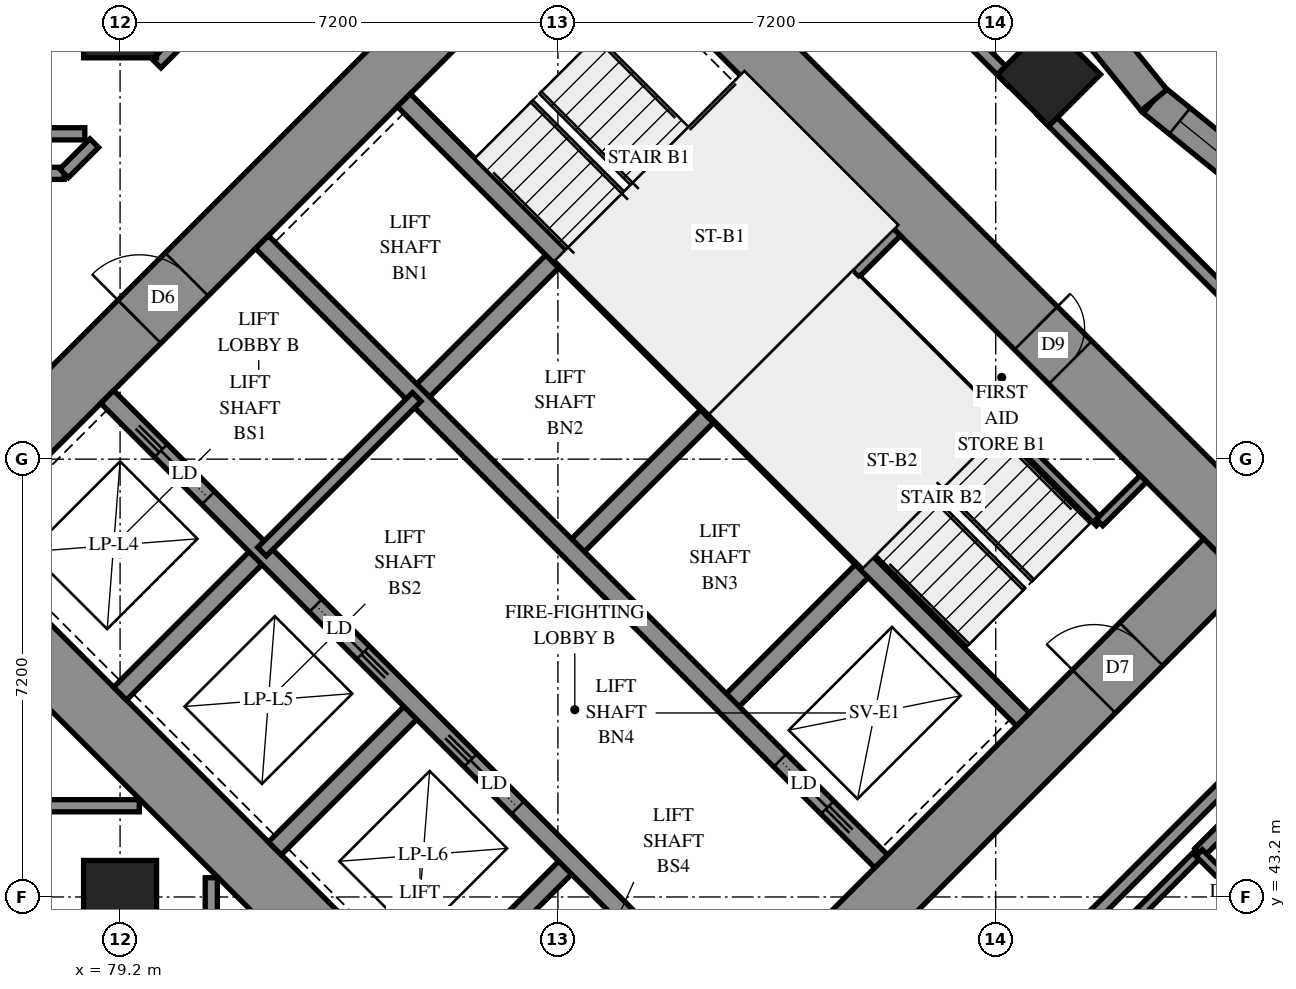
"""IFC4 building model, lengths in metres.
Left out: names, types, materials, properties, quantities, classifications, styles, units other than length and angle.
Written with IfcOpenShell. Run it as: python <this file> out.ifc"""

import sys

from ifc_helpers import new_model, si_unit, direction, frame, frame_2d, origin, origin_2d, place, context, subcontext, project, spatial, polyline, rectangle, outline, extrude, element, fill, save


model = new_model("IFC4")
c1 = context("Model", 3, precision=1e-05, world=origin(), true_north=direction((0.0, 1.0)))
c2 = subcontext(c1, "Body", "Model", "MODEL_VIEW")
j1 = project(units=[si_unit("LENGTHUNIT", "METRE"), si_unit("PLANEANGLEUNIT", "RADIAN")], contexts=[c1])
p1 = place(None, origin())
s1 = spatial("IfcSite", under=j1, at=p1, CompositionType="ELEMENT")
p2 = place(p1, origin())
s2 = spatial("IfcBuilding", under=s1, at=p2, CompositionType="ELEMENT")
p3 = place(p2, frame((0.0, 0.0, 33.8)))
s3 = spatial("IfcBuildingStorey", under=s2, at=p3, CompositionType="ELEMENT", Elevation=33.8)
for number, where, z_axis, x_axis in (
    (1, (79.2, 43.2, 0.0), (0.0, 0.0, 1.0), (1.0, 0.0, 0.0)),
    (2, (79.2, 57.6, 0.0), (0.0, 0.0, 1.0), (1.0, 0.0, 0.0)),
    (3, (94.474, 56.727, 0.0), (0.0, 0.0, 1.0), (0.707, -0.707, 0.0)),
):
    element("IfcColumn", number, at=place(p3, frame(where, z_axis=z_axis, x_axis=x_axis)), inside=s3, PredefinedType="COLUMN", context=c2, shape_type="SweptSolid", body=[
        extrude(rectangle(XDim=1.2, YDim=1.2, at=origin_2d()), origin(), (0.0, 0.0, 1.0), 3.1),
    ])
p4 = place(p3, frame((75.594, 49.443, -0.3), z_axis=(0.0, 0.0, 1.0), x_axis=(0.7071037324, -0.70710983, 0.0)))
e4 = element("IfcWall", 4, at=p4, inside=s3, PredefinedType="SHEAR", context=c2, shape_type="SweptSolid", body=[
    extrude(rectangle(XDim=16.4, YDim=1.0, at=frame_2d((8.2, 0.0))), origin(), (0.0, 0.0, 1.0), 2.7),
])
p5 = place(p3, frame((86.483, 60.333, -0.3), z_axis=(0.0, 0.0, 1.0), x_axis=(0.70710983, -0.7071037324, 0.0)))
e5 = element("IfcWall", 5, at=p5, inside=s3, PredefinedType="SHEAR", context=c2, shape_type="SweptSolid", body=[
    extrude(rectangle(XDim=16.4, YDim=1.0, at=frame_2d((8.2, 0.0))), origin(), (0.0, 0.0, 1.0), 2.7),
])
p6 = place(p5, frame((11.0, 0.0, 0.3)))
e6 = element("IfcOpeningElement", 6, at=p6, cuts=e5, PredefinedType="OPENING", context=c2, shape_type="SweptSolid", body=[
    extrude(rectangle(XDim=0.8, YDim=2.1, at=frame_2d((0.4, 1.05))), frame((0.0, 0.51, 0.0), z_axis=(0.0, -1.0, 0.0), x_axis=(1.0, 0.0, 0.0)), (0.0, 0.0, 1.0), 1.02),
])
p7 = place(p3, frame((76.301, 49.443, -0.3), z_axis=(0.0, 0.0, 1.0), x_axis=(0.7071067812, 0.7071067812, 0.0)))
e7 = element("IfcWall", 7, at=p7, inside=s3, PredefinedType="SHEAR", context=c2, shape_type="SweptSolid", body=[
    extrude(rectangle(XDim=14.4, YDim=1.0, at=frame_2d((7.2, 0.0))), origin(), (0.0, 0.0, 1.0), 2.7),
])
p8 = place(p7, frame((4.55, 0.0, 0.3)))
e8 = element("IfcOpeningElement", 8, at=p8, cuts=e7, PredefinedType="OPENING", context=c2, shape_type="SweptSolid", body=[
    extrude(rectangle(XDim=1.1, YDim=2.1, at=frame_2d((0.55, 1.05))), frame((0.0, 0.51, 0.0), z_axis=(0.0, -1.0, 0.0), x_axis=(1.0, 0.0, 0.0)), (0.0, 0.0, 1.0), 1.02),
])
p9 = place(p7, frame((11.35, 0.0, 0.3)))
e9 = element("IfcOpeningElement", 9, at=p9, cuts=e7, PredefinedType="OPENING", context=c2, shape_type="SweptSolid", body=[
    extrude(rectangle(XDim=1.1, YDim=2.1, at=frame_2d((0.55, 1.05))), frame((0.0, 0.51, 0.0), z_axis=(0.0, -1.0, 0.0), x_axis=(1.0, 0.0, 0.0)), (0.0, 0.0, 1.0), 1.02),
])
p10 = place(p3, frame((87.19, 38.554, -0.3), z_axis=(0.0, 0.0, 1.0), x_axis=(0.707103309, 0.7071102534, 0.0)))
e10 = element("IfcWall", 10, at=p10, inside=s3, PredefinedType="SHEAR", context=c2, shape_type="SweptSolid", body=[
    extrude(rectangle(XDim=14.4, YDim=1.0, at=frame_2d((7.2, 0.0))), origin(), (0.0, 0.0, 1.0), 2.7),
])
p11 = place(p10, frame((4.55, 0.0, 0.3)))
e11 = element("IfcOpeningElement", 11, at=p11, cuts=e10, PredefinedType="OPENING", context=c2, shape_type="SweptSolid", body=[
    extrude(rectangle(XDim=1.1, YDim=2.1, at=frame_2d((0.55, 1.05))), frame((0.0, 0.51, 0.0), z_axis=(0.0, -1.0, 0.0), x_axis=(1.0, 0.0, 0.0)), (0.0, 0.0, 1.0), 1.02),
])
p12 = place(p10, frame((11.35, 0.0, 0.3)))
e12 = element("IfcOpeningElement", 12, at=p12, cuts=e10, PredefinedType="OPENING", context=c2, shape_type="SweptSolid", body=[
    extrude(rectangle(XDim=1.1, YDim=2.1, at=frame_2d((0.55, 1.05))), frame((0.0, 0.51, 0.0), z_axis=(0.0, -1.0, 0.0), x_axis=(1.0, 0.0, 0.0)), (0.0, 0.0, 1.0), 1.02),
])
for number, where, z_axis, x_axis in (
    (13, (79.2, 46.544, 0.0), (0.0, 0.0, 1.0), (0.707, 0.707, 0.0)),
    (14, (84.079, 51.423, 0.0), (0.0, 0.0, 1.0), (0.707, 0.707, 0.0)),
):
    element("IfcWall", number, at=place(p3, frame(where, z_axis=z_axis, x_axis=x_axis)), inside=s3, PredefinedType="SOLIDWALL", context=c2, shape_type="SweptSolid", body=[
        extrude(rectangle(XDim=3.3, YDim=0.3, at=frame_2d((1.65, 0.0))), origin(), (0.0, 0.0, 1.0), 3.1),
    ])
p13 = place(p3, frame((81.746, 43.999, 0.0), z_axis=(0.0, 0.0, 1.0), x_axis=(0.7071067812, 0.7071067812, 0.0)))
e15 = element("IfcWall", 15, at=p13, inside=s3, PredefinedType="SOLIDWALL", context=c2, shape_type="SweptSolid", body=[
    extrude(rectangle(XDim=3.3, YDim=0.3, at=frame_2d((1.65, 0.0))), origin(), (0.0, 0.0, 1.0), 3.1),
])
p14 = place(p3, frame((86.625, 48.878, 0.0), z_axis=(0.0, 0.0, 1.0), x_axis=(0.7071067812, 0.7071067812, 0.0)))
e16 = element("IfcWall", 16, at=p14, inside=s3, PredefinedType="SOLIDWALL", context=c2, shape_type="SweptSolid", body=[
    extrude(rectangle(XDim=3.3, YDim=0.3, at=frame_2d((1.65, 0.0))), origin(), (0.0, 0.0, 1.0), 3.1),
])
p15 = place(p3, frame((84.291, 41.453, 0.0), z_axis=(0.0, 0.0, 1.0), x_axis=(0.7071067812, 0.7071067812, 0.0)))
e17 = element("IfcWall", 17, at=p15, inside=s3, PredefinedType="SOLIDWALL", context=c2, shape_type="SweptSolid", body=[
    extrude(rectangle(XDim=3.3, YDim=0.3, at=frame_2d((1.65, 0.0))), origin(), (0.0, 0.0, 1.0), 3.1),
])
p16 = place(p3, frame((89.17, 46.332, 0.0), z_axis=(0.0, 0.0, 1.0), x_axis=(0.7071067812, 0.7071067812, 0.0)))
e18 = element("IfcWall", 18, at=p16, inside=s3, PredefinedType="SOLIDWALL", context=c2, shape_type="SweptSolid", body=[
    extrude(rectangle(XDim=3.3, YDim=0.3, at=frame_2d((1.65, 0.0))), origin(), (0.0, 0.0, 1.0), 3.1),
])
p17 = place(p3, frame((78.988, 51.423, 0.0), z_axis=(0.0, 0.0, 1.0), x_axis=(0.7071067812, -0.7071067812, 0.0)))
e19 = element("IfcWall", 19, at=p17, inside=s3, PredefinedType="SOLIDWALL", context=c2, shape_type="SweptSolid", body=[
    extrude(rectangle(XDim=14.4, YDim=0.3, at=frame_2d((7.2, 0.0))), origin(), (0.0, 0.0, 1.0), 3.1),
])
p18 = place(p17, frame((1.25, 0.0, 0.0)))
e20 = element("IfcOpeningElement", 20, at=p18, cuts=e19, PredefinedType="OPENING", context=c2, shape_type="SweptSolid", body=[
    extrude(rectangle(XDim=1.1, YDim=2.1, at=frame_2d((0.55, 1.05))), frame((0.0, 0.16, 0.0), z_axis=(0.0, -1.0, 0.0), x_axis=(1.0, 0.0, 0.0)), (0.0, 0.0, 1.0), 0.32),
])
p19 = place(p17, frame((4.85, 0.0, 0.0)))
e21 = element("IfcOpeningElement", 21, at=p19, cuts=e19, PredefinedType="OPENING", context=c2, shape_type="SweptSolid", body=[
    extrude(rectangle(XDim=1.1, YDim=2.1, at=frame_2d((0.55, 1.05))), frame((0.0, 0.16, 0.0), z_axis=(0.0, -1.0, 0.0), x_axis=(1.0, 0.0, 0.0)), (0.0, 0.0, 1.0), 0.32),
])
p20 = place(p17, frame((8.45, 0.0, 0.0)))
e22 = element("IfcOpeningElement", 22, at=p20, cuts=e19, PredefinedType="OPENING", context=c2, shape_type="SweptSolid", body=[
    extrude(rectangle(XDim=1.1, YDim=2.1, at=frame_2d((0.55, 1.05))), frame((0.0, 0.16, 0.0), z_axis=(0.0, -1.0, 0.0), x_axis=(1.0, 0.0, 0.0)), (0.0, 0.0, 1.0), 0.32),
])
p21 = place(p17, frame((12.05, 0.0, 0.0)))
e23 = element("IfcOpeningElement", 23, at=p21, cuts=e19, PredefinedType="OPENING", context=c2, shape_type="SweptSolid", body=[
    extrude(rectangle(XDim=1.1, YDim=2.1, at=frame_2d((0.55, 1.05))), frame((0.0, 0.16, 0.0), z_axis=(0.0, -1.0, 0.0), x_axis=(1.0, 0.0, 0.0)), (0.0, 0.0, 1.0), 0.32),
])
p22 = place(p3, frame((81.534, 53.969, 0.0), z_axis=(0.0, 0.0, 1.0), x_axis=(0.707103309, -0.7071102534, 0.0)))
e24 = element("IfcWall", 24, at=p22, inside=s3, PredefinedType="SOLIDWALL", context=c2, shape_type="SweptSolid", body=[
    extrude(rectangle(XDim=14.4, YDim=0.3, at=frame_2d((7.2, 0.0))), origin(), (0.0, 0.0, 1.0), 3.1),
])
p23 = place(p22, frame((12.05, 0.0, 0.0)))
e25 = element("IfcOpeningElement", 25, at=p23, cuts=e24, PredefinedType="OPENING", context=c2, shape_type="SweptSolid", body=[
    extrude(rectangle(XDim=1.1, YDim=2.1, at=frame_2d((0.55, 1.05))), frame((0.0, 0.16, 0.0), z_axis=(0.0, -1.0, 0.0), x_axis=(1.0, 0.0, 0.0)), (0.0, 0.0, 1.0), 0.32),
])
for number, where, z_axis, x_axis in (
    (26, (83.867, 56.302, 0.0), (0.0, 0.0, 1.0), (0.707, -0.707, 0.0)),
    (27, (88.958, 51.211, 0.0), (0.0, 0.0, 1.0), (0.707, -0.707, 0.0)),
):
    element("IfcWall", number, at=place(p3, frame(where, z_axis=z_axis, x_axis=x_axis)), inside=s3, PredefinedType="SOLIDWALL", context=c2, shape_type="SweptSolid", body=[
        extrude(rectangle(XDim=7.2, YDim=0.3, at=frame_2d((3.6, 0.0))), origin(), (0.0, 0.0, 1.0), 3.1),
    ])
p24 = place(p3, frame((88.958, 51.211, 0.0), z_axis=(0.0, 0.0, 1.0), x_axis=(0.7071067812, 0.7071067812, 0.0)))
e28 = element("IfcWall", 28, at=p24, inside=s3, PredefinedType="SOLIDWALL", context=c2, shape_type="SweptSolid", body=[
    extrude(rectangle(XDim=4.2, YDim=0.3, at=frame_2d((2.1, 0.0))), origin(), (0.0, 0.0, 1.0), 3.1),
])
p25 = place(p3, frame((98.884, 54.133, 0.0), z_axis=(0.0, 0.0, 1.0), x_axis=(-0.7772131435, 0.6292374191, 0.0)))
e29 = element("IfcWall", 29, at=p25, inside=s3, PredefinedType="SOLIDWALL", context=c2, shape_type="SweptSolid", body=[
    extrude(outline(polyline([(-0.029, -0.275), (3.421, -0.275), (3.479, 0.275), (0.029, 0.275), (-0.029, -0.275)])), origin(), (0.0, 0.0, 1.0), 3.1),
])
p26 = place(p25, frame((1.705, 0.0, 0.5)))
e30 = element("IfcOpeningElement", 30, at=p26, cuts=e29, PredefinedType="OPENING", context=c2, shape_type="SweptSolid", body=[
    extrude(rectangle(XDim=1.2, YDim=2.45, at=frame_2d((0.6, 1.225))), frame((0.0, 0.285, 0.0), z_axis=(0.0, -1.0, 0.0), x_axis=(1.0, 0.0, 0.0)), (0.0, 0.0, 1.0), 0.57),
])
p27 = place(p3, frame((96.202, 56.304, 0.0), z_axis=(0.0, 0.0, 1.0), x_axis=(-0.6292374191, 0.7772131435, 0.0)))
e31 = element("IfcWall", 31, at=p27, inside=s3, PredefinedType="SOLIDWALL", context=c2, shape_type="SweptSolid", body=[
    extrude(outline(polyline([(0.029, -0.275), (3.479, -0.275), (3.421, 0.275), (-0.029, 0.275), (0.029, -0.275)])), origin(), (0.0, 0.0, 1.0), 3.1),
])
p28 = place(p27, frame((1.775, 0.0, 0.5)))
e32 = element("IfcOpeningElement", 32, at=p28, cuts=e31, PredefinedType="OPENING", context=c2, shape_type="SweptSolid", body=[
    extrude(rectangle(XDim=1.2, YDim=2.45, at=frame_2d((0.6, 1.225))), frame((0.0, 0.285, 0.0), z_axis=(0.0, -1.0, 0.0), x_axis=(1.0, 0.0, 0.0)), (0.0, 0.0, 1.0), 0.57),
])
p29 = place(p3, frame((91.313, 53.354, 0.0), z_axis=(0.0, 0.0, 1.0), x_axis=(0.7071067812, -0.7071067812, 0.0)))
e33 = element("IfcWall", 33, at=p29, inside=s3, PredefinedType="PARTITIONING", context=c2, shape_type="SweptSolid", body=[
    extrude(rectangle(XDim=5.65, YDim=0.15, at=frame_2d((2.825, 0.0))), origin(), (0.0, 0.0, 1.0), 3.1),
])
p30 = place(p3, frame((95.308, 49.358, 0.0), z_axis=(0.0, 0.0, 1.0), x_axis=(0.70705776, 0.707155799, 0.0)))
e34 = element("IfcWall", 34, at=p30, inside=s3, PredefinedType="PARTITIONING", context=c2, shape_type="SweptSolid", body=[
    extrude(rectangle(XDim=1.02, YDim=0.15, at=frame_2d((0.51, 0.0))), origin(), (0.0, 0.0, 1.0), 3.1),
])
p31 = place(p3, frame((81.534, 48.878, 0.0), z_axis=(0.0, 0.0, 1.0), x_axis=(0.707092892, 0.7071206701, 0.0)))
e35 = element("IfcWall", 35, at=p31, inside=s3, PredefinedType="PARTITIONING", context=c2, shape_type="SweptSolid", body=[
    extrude(rectangle(XDim=3.6, YDim=0.2, at=frame_2d((1.8, 0.0))), origin(), (0.0, 0.0, 1.0), 3.1),
])
p32 = place(p3, frame((94.901, 42.583, 0.0), z_axis=(0.0, 0.0, 1.0), x_axis=(0.7072154749, 0.7069980708, 0.0)))
e36 = element("IfcWall", 36, at=p32, inside=s3, PredefinedType="PARTITIONING", context=c2, shape_type="SweptSolid", body=[
    extrude(rectangle(XDim=9.2, YDim=0.2, at=frame_2d((4.6, 0.0))), origin(), (0.0, 0.0, 1.0), 3.1),
])
p33 = place(p3, frame((96.947, 43.929, 0.0), z_axis=(0.0, 0.0, 1.0), x_axis=(0.7071067812, 0.7071067812, 0.0)))
e37 = element("IfcWall", 37, at=p33, inside=s3, PredefinedType="PARTITIONING", context=c2, shape_type="SweptSolid", body=[
    extrude(rectangle(XDim=8.201, YDim=0.2, at=frame_2d((4.101, 0.0))), origin(), (0.0, 0.0, 1.0), 3.1),
])
p34 = place(p3, frame((89.271, 61.215, 0.0), z_axis=(0.0, 0.0, 1.0), x_axis=(0.7071067812, -0.7071067812, 0.0)))
e38 = element("IfcWall", 38, at=p34, inside=s3, PredefinedType="PARTITIONING", context=c2, shape_type="SweptSolid", body=[
    extrude(rectangle(XDim=6.505, YDim=0.2, at=frame_2d((3.253, 0.0))), origin(), (0.0, 0.0, 1.0), 3.1),
])
p35 = place(p3, frame((94.363, 56.123, 0.0), z_axis=(0.0, 0.0, 1.0), x_axis=(0.7071067812, -0.7071067812, 0.0)))
e39 = element("IfcWall", 39, at=p35, inside=s3, PredefinedType="PARTITIONING", context=c2, shape_type="SweptSolid", body=[
    extrude(rectangle(XDim=6.503, YDim=0.2, at=frame_2d((3.251, 0.0))), origin(), (0.0, 0.0, 1.0), 3.1),
])
p36 = place(p3, frame((75.102, 55.1, 0.0), z_axis=(0.0, 0.0, 1.0), x_axis=(1.0, 0.0, 0.0)))
e40 = element("IfcWall", 40, at=p36, inside=s3, PredefinedType="PARTITIONING", context=c2, shape_type="SweptSolid", body=[
    extrude(rectangle(XDim=3.178, YDim=0.2, at=frame_2d((1.589, 0.0))), origin(), (0.0, 0.0, 1.0), 3.1),
])
p37 = place(p36, frame((0.594, 0.0, 0.0)))
e41 = element("IfcOpeningElement", 41, at=p37, cuts=e40, PredefinedType="OPENING", context=c2, shape_type="SweptSolid", body=[
    extrude(rectangle(XDim=1.0, YDim=2.1, at=frame_2d((0.5, 1.05))), frame((0.0, 0.11, 0.0), z_axis=(0.0, -1.0, 0.0), x_axis=(1.0, 0.0, 0.0)), (0.0, 0.0, 1.0), 0.22),
])
p38 = place(p3, frame((95.252, 42.23, 0.0), z_axis=(0.0, 0.0, 1.0), x_axis=(0.706689978, 0.7075233388, 0.0)))
e42 = element("IfcWall", 42, at=p38, inside=s3, PredefinedType="PARTITIONING", context=c2, shape_type="SweptSolid", body=[
    extrude(rectangle(XDim=2.4, YDim=0.15, at=frame_2d((1.2, 0.0))), origin(), (0.0, 0.0, 1.0), 3.1),
])
p39 = place(p3, frame((96.945, 43.925, 0.0), z_axis=(0.0, 0.0, 1.0), x_axis=(0.7071067812, -0.7071067812, 0.0)))
e43 = element("IfcWall", 43, at=p39, inside=s3, PredefinedType="PARTITIONING", context=c2, shape_type="SweptSolid", body=[
    extrude(rectangle(XDim=1.901, YDim=0.15, at=frame_2d((0.95, 0.0))), origin(), (0.0, 0.0, 1.0), 3.1),
])
p40 = place(p39, frame((0.505, 0.0, 0.0)))
e44 = element("IfcOpeningElement", 44, at=p40, cuts=e43, PredefinedType="OPENING", context=c2, shape_type="SweptSolid", body=[
    extrude(rectangle(XDim=0.8, YDim=2.1, at=frame_2d((0.4, 1.05))), frame((0.0, 0.085, 0.0), z_axis=(0.0, -1.0, 0.0), x_axis=(1.0, 0.0, 0.0)), (0.0, 0.0, 1.0), 0.17),
])
for number, where, z_axis, x_axis in (
    (45, (77.702, 44.7, 0.0), (0.0, 0.0, 1.0), (1.0, 0.0, 0.0)),
    (46, (80.7, 41.702, 0.0), (0.0, 0.0, 1.0), (0.0, 1.0, 0.0)),
):
    element("IfcWall", number, at=place(p3, frame(where, z_axis=z_axis, x_axis=x_axis)), inside=s3, PredefinedType="PARTITIONING", context=c2, shape_type="SweptSolid", body=[
        extrude(rectangle(XDim=1.814, YDim=0.2, at=frame_2d((0.907, 0.0))), origin(), (0.0, 0.0, 1.0), 3.1),
    ])
p41 = place(p3, frame((79.801, 56.905, 0.0), z_axis=(0.0, 0.0, 1.0), x_axis=(0.7071067812, 0.7071067812, 0.0)))
e47 = element("IfcWall", 47, at=p41, inside=s3, PredefinedType="PARTITIONING", context=c2, shape_type="SweptSolid", body=[
    extrude(rectangle(XDim=1.765, YDim=0.2, at=frame_2d((0.882, 0.0))), origin(), (0.0, 0.0, 1.0), 3.1),
])
p42 = place(p3, frame((77.352, 55.75, 0.0), z_axis=(0.0, 0.0, 1.0), x_axis=(1.0, 0.0, 0.0)))
e48 = element("IfcWall", 48, at=p42, inside=s3, PredefinedType="PARTITIONING", context=c2, shape_type="SweptSolid", body=[
    extrude(rectangle(XDim=1.268, YDim=0.2, at=frame_2d((0.634, 0.0))), origin(), (0.0, 0.0, 1.0), 3.1),
])
p43 = place(p3, frame((78.279, 55.1, 0.0), z_axis=(0.0, 0.0, 1.0), x_axis=(0.7071067812, 0.7071067812, 0.0)))
e49 = element("IfcWall", 49, at=p43, inside=s3, PredefinedType="PARTITIONING", context=c2, shape_type="SweptSolid", body=[
    extrude(rectangle(XDim=0.701, YDim=0.2, at=frame_2d((0.351, 0.0))), origin(), (0.0, 0.0, 1.0), 3.1),
])
p44 = place(p26, origin())
e50 = element("IfcWindow", 50, at=p44, inside=s3, PartitioningType="SINGLE_PANEL", PredefinedType="WINDOW", context=c2, shape_type="SweptSolid", body=[
    extrude(rectangle(XDim=1.2, YDim=2.45, at=frame_2d((0.6, 1.225))), frame((0.0, 0.155, 0.0), z_axis=(0.0, -1.0, 0.0), x_axis=(1.0, 0.0, 0.0)), (0.0, 0.0, 1.0), 0.06),
])
fill(e30, e50)
p45 = place(p6, origin())
e51 = element("IfcDoor", 51, at=p45, inside=s3, OperationType="SINGLE_SWING_RIGHT", PredefinedType="DOOR", context=c2, shape_type="SweptSolid", body=[
    extrude(rectangle(XDim=0.8, YDim=2.1, at=frame_2d((0.4, 1.05))), frame((0.0, -0.44, 0.0), z_axis=(0.0, -1.0, 0.0), x_axis=(1.0, 0.0, 0.0)), (0.0, 0.0, 1.0), 0.05),
])
fill(e6, e51)
p46 = place(p8, origin())
e52 = element("IfcDoor", 52, at=p46, inside=s3, OperationType="DOUBLE_DOOR_SINGLE_SWING", PredefinedType="DOOR", context=c2, shape_type="SweptSolid", body=[
    extrude(rectangle(XDim=1.1, YDim=2.1, at=frame_2d((0.55, 1.05))), frame((0.0, 0.025, 0.0), z_axis=(0.0, -1.0, 0.0), x_axis=(1.0, 0.0, 0.0)), (0.0, 0.0, 1.0), 0.05),
])
fill(e8, e52)
p47 = place(p12, origin())
e53 = element("IfcDoor", 53, at=p47, inside=s3, OperationType="SINGLE_SWING_RIGHT", PredefinedType="DOOR", context=c2, shape_type="SweptSolid", body=[
    extrude(rectangle(XDim=1.1, YDim=2.1, at=frame_2d((0.55, 1.05))), frame((0.0, 0.025, 0.0), z_axis=(0.0, -1.0, 0.0), x_axis=(1.0, 0.0, 0.0)), (0.0, 0.0, 1.0), 0.05),
])
fill(e12, e53)
p48 = place(p18, origin())
e54 = element("IfcDoor", 54, at=p48, inside=s3, OperationType="SLIDING_TO_LEFT", PredefinedType="DOOR", context=c2, shape_type="SweptSolid", body=[
    extrude(rectangle(XDim=1.1, YDim=2.1, at=frame_2d((0.55, 1.05))), frame((0.0, 0.025, 0.0), z_axis=(0.0, -1.0, 0.0), x_axis=(1.0, 0.0, 0.0)), (0.0, 0.0, 1.0), 0.05),
])
fill(e20, e54)
p49 = place(p19, origin())
e55 = element("IfcDoor", 55, at=p49, inside=s3, OperationType="SLIDING_TO_RIGHT", PredefinedType="DOOR", context=c2, shape_type="SweptSolid", body=[
    extrude(rectangle(XDim=1.1, YDim=2.1, at=frame_2d((0.55, 1.05))), frame((0.0, 0.025, 0.0), z_axis=(0.0, -1.0, 0.0), x_axis=(1.0, 0.0, 0.0)), (0.0, 0.0, 1.0), 0.05),
])
fill(e21, e55)
p50 = place(p20, origin())
e56 = element("IfcDoor", 56, at=p50, inside=s3, OperationType="SLIDING_TO_LEFT", PredefinedType="DOOR", context=c2, shape_type="SweptSolid", body=[
    extrude(rectangle(XDim=1.1, YDim=2.1, at=frame_2d((0.55, 1.05))), frame((0.0, 0.025, 0.0), z_axis=(0.0, -1.0, 0.0), x_axis=(1.0, 0.0, 0.0)), (0.0, 0.0, 1.0), 0.05),
])
fill(e22, e56)
p51 = place(p23, origin())
e57 = element("IfcDoor", 57, at=p51, inside=s3, OperationType="SLIDING_TO_RIGHT", PredefinedType="DOOR", context=c2, shape_type="SweptSolid", body=[
    extrude(rectangle(XDim=1.1, YDim=2.1, at=frame_2d((0.55, 1.05))), frame((0.0, 0.025, 0.0), z_axis=(0.0, -1.0, 0.0), x_axis=(1.0, 0.0, 0.0)), (0.0, 0.0, 1.0), 0.05),
])
fill(e25, e57)
save(model, sys.argv[1])
